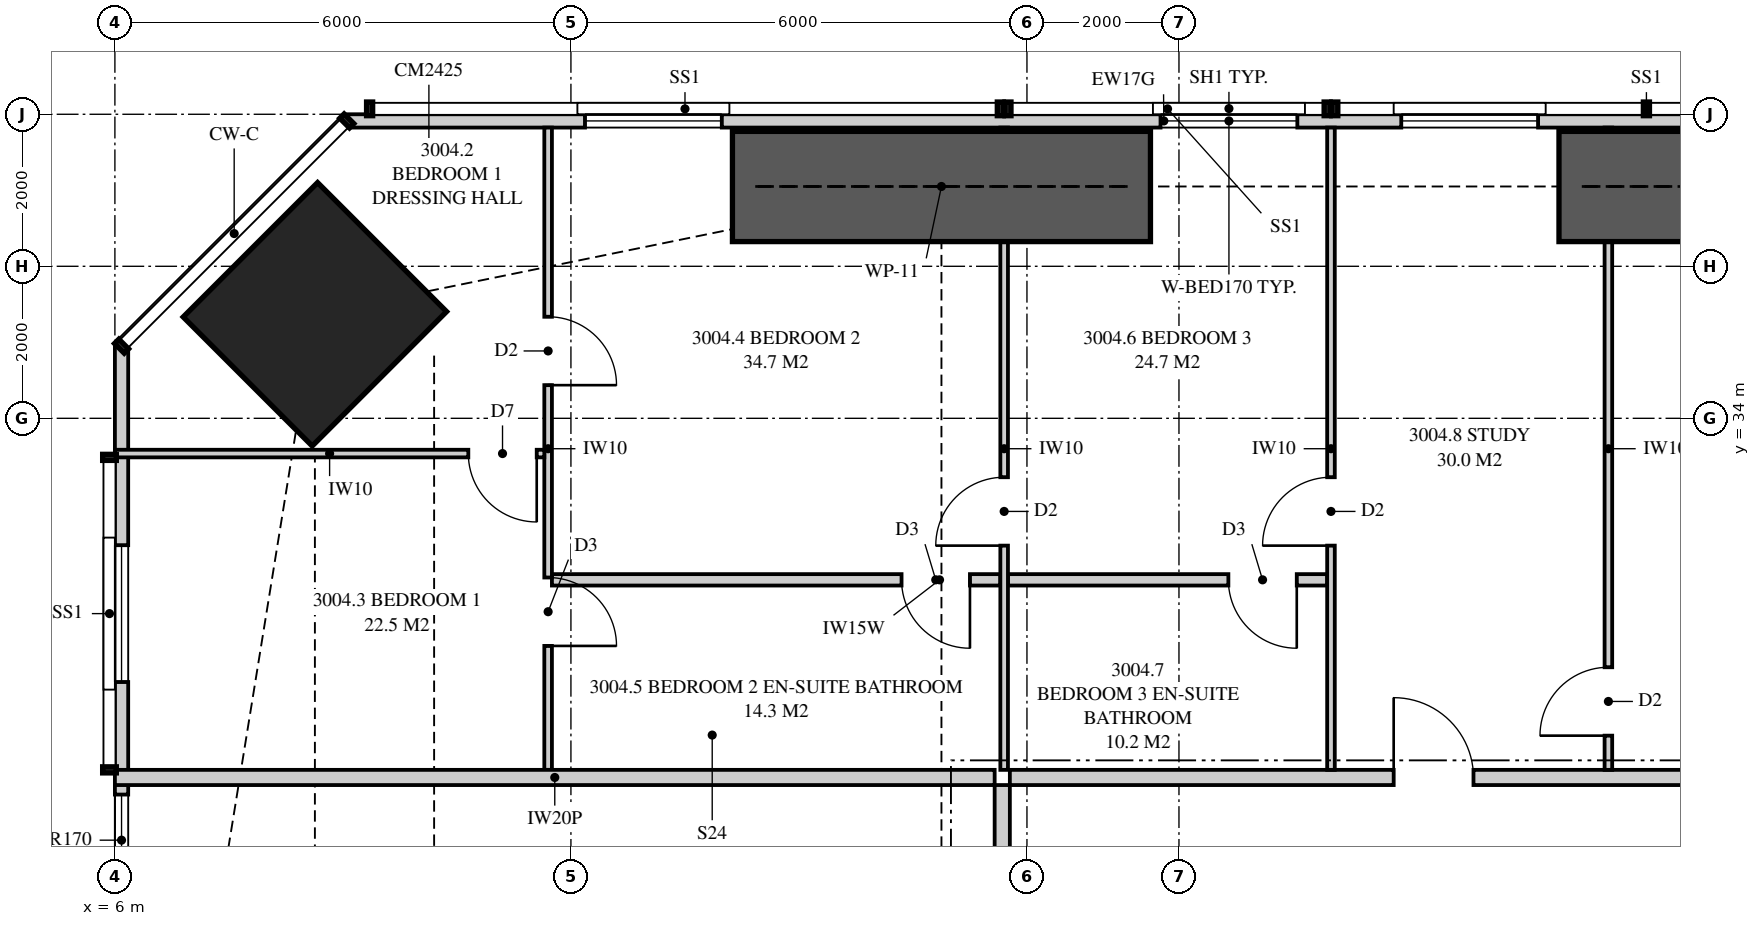
"""IFC4 building model, lengths in metres.
Left out: names, types, materials, properties, quantities, classifications, styles, units other than length and angle.
Written with IfcOpenShell. Run it as: python <this file> out.ifc"""

import sys

from ifc_helpers import new_model, si_unit, direction, frame, frame_2d, origin, origin_2d, place, context, subcontext, project, spatial, polyline, rectangle, outline, extrude, element, fill, save


model = new_model("IFC4")
c1 = context("Model", 3, precision=1e-05, world=origin(), true_north=direction((0.0, 1.0)))
c2 = subcontext(c1, "Body", "Model", "MODEL_VIEW")
j1 = project(units=[si_unit("LENGTHUNIT", "METRE"), si_unit("PLANEANGLEUNIT", "RADIAN")], contexts=[c1])
p1 = place(None, origin())
s1 = spatial("IfcSite", under=j1, at=p1, CompositionType="ELEMENT")
p2 = place(p1, origin())
s2 = spatial("IfcBuilding", under=s1, at=p2, CompositionType="ELEMENT")
p3 = place(p2, frame((0.0, 0.0, 111.55)))
s3 = spatial("IfcBuildingStorey", under=s2, at=p3, CompositionType="ELEMENT", Elevation=111.55)
p4 = place(p3, frame((8.631, 35.369, 0.0), z_axis=(0.0, 0.0, 1.0), x_axis=(0.707106781187, -0.707106781187, 0.0)))
e1 = element("IfcColumn", 1, at=p4, inside=s3, PredefinedType="COLUMN", context=c2, shape_type="SweptSolid", body=[
    extrude(rectangle(XDim=2.4, YDim=2.5, at=origin_2d()), origin(), (0.0, 0.0, 1.0), 3.35),
])
p5 = place(p3, frame((30.551, 37.913, 0.0), z_axis=(0.0, 0.0, 1.0), x_axis=(-1.0, 0.0, 0.0)))
e2 = element("IfcWall", 2, at=p5, inside=s3, PredefinedType="SOLIDWALL", context=c2, shape_type="SweptSolid", body=[
    extrude(outline(polyline([(0.0, 0.0), (21.499, 0.0), (21.499, 3.11), (13.879, 3.11), (13.879, 2.15), (13.834, 2.15), (13.834, 3.11), (13.676, 3.11), (13.676, 2.15), (0.0, 2.15), (0.0, 0.0)])), frame((0.0, 0.087, 0.0), z_axis=(0.0, -1.0, 0.0), x_axis=(1.0, 0.0, 0.0)), (0.0, 0.0, 1.0), 0.175),
])
p6 = place(p5, frame((5.826, 0.0, 0.4)))
e3 = element("IfcOpeningElement", 3, at=p6, cuts=e2, PredefinedType="OPENING", context=c2, shape_type="SweptSolid", body=[
    extrude(rectangle(XDim=1.8, YDim=1.7, at=frame_2d((0.9, 0.85))), frame((0.0, 0.097, 0.0), z_axis=(0.0, -1.0, 0.0), x_axis=(1.0, 0.0, 0.0)), (0.0, 0.0, 1.0), 0.195),
])
p7 = place(p5, frame((8.993, 0.0, 0.4)))
e4 = element("IfcOpeningElement", 4, at=p7, cuts=e2, PredefinedType="OPENING", context=c2, shape_type="SweptSolid", body=[
    extrude(rectangle(XDim=1.8, YDim=1.7, at=frame_2d((0.9, 0.85))), frame((0.0, 0.097, 0.0), z_axis=(0.0, -1.0, 0.0), x_axis=(1.0, 0.0, 0.0)), (0.0, 0.0, 1.0), 0.195),
])
p8 = place(p5, frame((16.566, 0.0, 0.4)))
e5 = element("IfcOpeningElement", 5, at=p8, cuts=e2, PredefinedType="OPENING", context=c2, shape_type="SweptSolid", body=[
    extrude(rectangle(XDim=1.8, YDim=1.7, at=frame_2d((0.9, 0.85))), frame((0.0, 0.097, 0.0), z_axis=(0.0, -1.0, 0.0), x_axis=(1.0, 0.0, 0.0)), (0.0, 0.0, 1.0), 0.195),
])
p9 = place(p3, frame((6.087, 34.949, 0.0), z_axis=(0.0, 0.0, 1.0), x_axis=(0.0, -1.0, 0.0)))
e6 = element("IfcWall", 6, at=p9, inside=s3, PredefinedType="SOLIDWALL", context=c2, shape_type="SweptSolid", body=[
    extrude(outline(polyline([(0.0, 0.0), (15.799, 0.0), (15.799, 2.15), (9.949, 2.15), (9.949, 3.11), (9.823, 3.11), (9.823, 2.15), (9.73, 2.15), (9.73, 3.11), (0.0, 3.11), (0.0, 0.0)])), frame((0.0, 0.087, 0.0), z_axis=(0.0, -1.0, 0.0), x_axis=(1.0, 0.0, 0.0)), (0.0, 0.0, 1.0), 0.175),
])
p10 = place(p9, frame((2.618, 0.0, 0.4)))
e7 = element("IfcOpeningElement", 7, at=p10, cuts=e6, PredefinedType="OPENING", context=c2, shape_type="SweptSolid", body=[
    extrude(rectangle(XDim=1.8, YDim=1.7, at=frame_2d((0.9, 0.85))), frame((0.0, 0.097, 0.0), z_axis=(0.0, -1.0, 0.0), x_axis=(1.0, 0.0, 0.0)), (0.0, 0.0, 1.0), 0.195),
])
p11 = place(p9, frame((5.899, 0.0, 0.4)))
e8 = element("IfcOpeningElement", 8, at=p11, cuts=e6, PredefinedType="OPENING", context=c2, shape_type="SweptSolid", body=[
    extrude(rectangle(XDim=1.2, YDim=1.7, at=frame_2d((0.6, 0.85))), frame((0.0, 0.097, 0.0), z_axis=(0.0, -1.0, 0.0), x_axis=(1.0, 0.0, 0.0)), (0.0, 0.0, 1.0), 0.195),
])
p12 = place(p9, frame((13.049, 0.0, 0.4)))
e9 = element("IfcOpeningElement", 9, at=p12, cuts=e6, PredefinedType="OPENING", context=c2, shape_type="SweptSolid", body=[
    extrude(rectangle(XDim=1.8, YDim=1.7, at=frame_2d((0.9, 0.85))), frame((0.0, 0.097, 0.0), z_axis=(0.0, -1.0, 0.0), x_axis=(1.0, 0.0, 0.0)), (0.0, 0.0, 1.0), 0.195),
])
p13 = place(p3, frame((17.775, 29.275, 0.0), z_axis=(0.0, 0.0, 1.0), x_axis=(1.0, 0.0, 0.0)))
e10 = element("IfcWall", 10, at=p13, inside=s3, PredefinedType="PARTITIONING", context=c2, shape_type="SweptSolid", body=[
    extrude(rectangle(XDim=9.188, YDim=0.2, at=frame_2d((4.594, 0.0))), origin(), (0.0, 0.0, 1.0), 3.11),
])
p14 = place(p13, frame((5.05, 0.0, 0.0)))
e11 = element("IfcOpeningElement", 11, at=p14, cuts=e10, PredefinedType="OPENING", context=c2, shape_type="SweptSolid", body=[
    extrude(rectangle(XDim=1.05, YDim=2.2, at=frame_2d((0.525, 1.1))), frame((0.0, 0.11, 0.0), z_axis=(0.0, -1.0, 0.0), x_axis=(1.0, 0.0, 0.0)), (0.0, 0.0, 1.0), 0.22),
])
p15 = place(p3, frame((11.7, 37.825, 0.0), z_axis=(0.0, 0.0, 1.0), x_axis=(0.0, -1.0, 0.0)))
e12 = element("IfcWall", 12, at=p15, inside=s3, PredefinedType="PARTITIONING", context=c2, shape_type="SweptSolid", body=[
    extrude(outline(polyline([(0.0, 0.0), (8.45, 0.0), (8.45, 3.11), (2.708, 3.11), (2.708, 2.15), (0.953, 2.15), (0.953, 3.11), (0.0, 3.11), (0.0, 0.0)])), frame((0.0, 0.05, 0.0), z_axis=(0.0, -1.0, 0.0), x_axis=(1.0, 0.0, 0.0)), (0.0, 0.0, 1.0), 0.1),
])
p16 = place(p15, frame((2.489, 0.0, 0.0)))
e13 = element("IfcOpeningElement", 13, at=p16, cuts=e12, PredefinedType="OPENING", context=c2, shape_type="SweptSolid", body=[
    extrude(rectangle(XDim=0.9, YDim=2.1, at=frame_2d((0.45, 1.05))), frame((0.0, 0.06, 0.0), z_axis=(0.0, -1.0, 0.0), x_axis=(1.0, 0.0, 0.0)), (0.0, 0.0, 1.0), 0.12),
])
p17 = place(p15, frame((5.919, 0.0, 0.0)))
e14 = element("IfcOpeningElement", 14, at=p17, cuts=e12, PredefinedType="OPENING", context=c2, shape_type="SweptSolid", body=[
    extrude(rectangle(XDim=0.9, YDim=2.1, at=frame_2d((0.45, 1.05))), frame((0.0, 0.06, 0.0), z_axis=(0.0, -1.0, 0.0), x_axis=(1.0, 0.0, 0.0)), (0.0, 0.0, 1.0), 0.12),
])
p18 = place(p3, frame((17.7, 37.825, 0.0), z_axis=(0.0, 0.0, 1.0), x_axis=(0.0, -1.0, 0.0)))
e15 = element("IfcWall", 15, at=p18, inside=s3, PredefinedType="PARTITIONING", context=c2, shape_type="SweptSolid", body=[
    extrude(outline(polyline([(1.635, 2.15), (0.0, 2.15), (0.0, 0.0), (8.45, 0.0), (8.45, 3.11), (1.635, 3.11), (1.635, 2.15)]), holes=[polyline([(1.021, 0.116), (0.529, 0.116), (0.529, 0.906), (1.021, 0.906), (1.021, 0.116)]), polyline([(1.021, 1.244), (0.529, 1.244), (0.529, 2.034), (1.021, 2.034), (1.021, 1.244)])]), frame((0.0, 0.05, 0.0), z_axis=(0.0, -1.0, 0.0), x_axis=(1.0, 0.0, 0.0)), (0.0, 0.0, 1.0), 0.1),
])
p19 = place(p18, frame((4.6, 0.0, 0.0)))
e16 = element("IfcOpeningElement", 16, at=p19, cuts=e15, PredefinedType="OPENING", context=c2, shape_type="SweptSolid", body=[
    extrude(rectangle(XDim=0.9, YDim=2.1, at=frame_2d((0.45, 1.05))), frame((0.0, 0.06, 0.0), z_axis=(0.0, -1.0, 0.0), x_axis=(1.0, 0.0, 0.0)), (0.0, 0.0, 1.0), 0.12),
])
p20 = place(p3, frame((22.0, 37.825, 0.0), z_axis=(0.0, 0.0, 1.0), x_axis=(0.0, -1.0, 0.0)))
e17 = element("IfcWall", 17, at=p20, inside=s3, PredefinedType="PARTITIONING", context=c2, shape_type="SweptSolid", body=[
    extrude(outline(polyline([(0.0, 0.0), (8.45, 0.0), (8.45, 3.11), (1.635, 3.11), (1.635, 2.15), (0.0, 2.15), (0.0, 3.11), (0.0, 0.0)])), frame((0.0, 0.05, 0.0), z_axis=(0.0, -1.0, 0.0), x_axis=(1.0, 0.0, 0.0)), (0.0, 0.0, 1.0), 0.1),
])
p21 = place(p20, frame((4.6, 0.0, 0.0)))
e18 = element("IfcOpeningElement", 18, at=p21, cuts=e17, PredefinedType="OPENING", context=c2, shape_type="SweptSolid", body=[
    extrude(rectangle(XDim=0.9, YDim=2.1, at=frame_2d((0.45, 1.05))), frame((0.0, 0.06, 0.0), z_axis=(0.0, -1.0, 0.0), x_axis=(1.0, 0.0, 0.0)), (0.0, 0.0, 1.0), 0.12),
])
p22 = place(p3, frame((6.0, 33.536, 0.0), z_axis=(0.0, 0.0, 1.0), x_axis=(1.0, 0.0, 0.0)))
e19 = element("IfcWall", 19, at=p22, inside=s3, PredefinedType="PARTITIONING", context=c2, shape_type="SweptSolid", body=[
    extrude(outline(polyline([(0.0, 0.0), (5.65, 0.0), (5.65, 3.11), (5.46, 3.11), (5.46, 2.51), (3.206, 2.51), (3.206, 2.15), (1.463, 2.15), (1.463, 3.11), (0.0, 3.11), (0.0, 0.0)])), frame((0.0, 0.05, 0.0), z_axis=(0.0, -1.0, 0.0), x_axis=(1.0, 0.0, 0.0)), (0.0, 0.0, 1.0), 0.1),
])
p23 = place(p22, frame((4.65, 0.0, 0.0)))
e20 = element("IfcOpeningElement", 20, at=p23, cuts=e19, PredefinedType="OPENING", context=c2, shape_type="SweptSolid", body=[
    extrude(rectangle(XDim=0.9, YDim=2.1, at=frame_2d((0.45, 1.05))), frame((0.0, 0.06, 0.0), z_axis=(0.0, -1.0, 0.0), x_axis=(1.0, 0.0, 0.0)), (0.0, 0.0, 1.0), 0.12),
])
p24 = place(p3, frame((11.75, 31.875, 0.0), z_axis=(0.0, 0.0, 1.0), x_axis=(1.0, 0.0, 0.0)))
e21 = element("IfcWall", 21, at=p24, inside=s3, PredefinedType="PLUMBINGWALL", context=c2, shape_type="SweptSolid", body=[
    extrude(outline(polyline([(0.0, 0.0), (5.9, 0.0), (5.9, 3.11), (5.438, 3.11), (5.438, 2.541), (4.812, 2.541), (4.812, 3.11), (0.0, 3.11), (0.0, 0.0)])), frame((0.0, 0.075, 0.0), z_axis=(0.0, -1.0, 0.0), x_axis=(1.0, 0.0, 0.0)), (0.0, 0.0, 1.0), 0.15),
])
p25 = place(p24, frame((4.6, 0.0, 0.0)))
e22 = element("IfcOpeningElement", 22, at=p25, cuts=e21, PredefinedType="OPENING", context=c2, shape_type="SweptSolid", body=[
    extrude(rectangle(XDim=0.9, YDim=2.1, at=frame_2d((0.45, 1.05))), frame((0.0, 0.085, 0.0), z_axis=(0.0, -1.0, 0.0), x_axis=(1.0, 0.0, 0.0)), (0.0, 0.0, 1.0), 0.17),
])
p26 = place(p3, frame((17.75, 31.875, 0.0), z_axis=(0.0, 0.0, 1.0), x_axis=(1.0, 0.0, 0.0)))
e23 = element("IfcWall", 23, at=p26, inside=s3, PredefinedType="PLUMBINGWALL", context=c2, shape_type="SweptSolid", body=[
    extrude(rectangle(XDim=4.2, YDim=0.15, at=frame_2d((2.1, 0.0))), origin(), (0.0, 0.0, 1.0), 3.11),
])
p27 = place(p26, frame((2.9, 0.0, 0.0)))
e24 = element("IfcOpeningElement", 24, at=p27, cuts=e23, PredefinedType="OPENING", context=c2, shape_type="SweptSolid", body=[
    extrude(rectangle(XDim=0.9, YDim=2.1, at=frame_2d((0.45, 1.05))), frame((0.0, 0.085, 0.0), z_axis=(0.0, -1.0, 0.0), x_axis=(1.0, 0.0, 0.0)), (0.0, 0.0, 1.0), 0.17),
])
p28 = place(p3, frame((25.65, 37.825, 0.0), z_axis=(0.0, 0.0, 1.0), x_axis=(0.0, -1.0, 0.0)))
e25 = element("IfcWall", 25, at=p28, inside=s3, PredefinedType="PARTITIONING", context=c2, shape_type="SweptSolid", body=[
    extrude(outline(polyline([(0.529, 2.15), (0.0, 2.15), (0.0, 0.0), (0.529, 0.0), (0.529, 0.034), (1.021, 0.034), (1.021, 0.0), (8.45, 0.0), (8.45, 3.11), (1.635, 3.11), (1.635, 2.15), (1.021, 2.15), (1.021, 2.116), (0.529, 2.116), (0.529, 2.15)])), frame((0.0, 0.05, 0.0), z_axis=(0.0, -1.0, 0.0), x_axis=(1.0, 0.0, 0.0)), (0.0, 0.0, 1.0), 0.1),
])
p29 = place(p28, frame((7.1, 0.0, 0.0)))
e26 = element("IfcOpeningElement", 26, at=p29, cuts=e25, PredefinedType="OPENING", context=c2, shape_type="SweptSolid", body=[
    extrude(rectangle(XDim=0.9, YDim=2.1, at=frame_2d((0.45, 1.05))), frame((0.0, 0.06, 0.0), z_axis=(0.0, -1.0, 0.0), x_axis=(1.0, 0.0, 0.0)), (0.0, 0.0, 1.0), 0.12),
])
p30 = place(p3, frame((6.0, 29.275, 0.0), z_axis=(0.0, 0.0, 1.0), x_axis=(1.0, 0.0, 0.0)))
e27 = element("IfcWall", 27, at=p30, inside=s3, PredefinedType="PARTITIONING", context=c2, shape_type="SweptSolid", body=[
    extrude(outline(polyline([(0.0, 0.0), (11.575, 0.0), (11.575, 3.11), (11.212, 3.11), (11.212, 2.541), (10.538, 2.541), (10.538, 3.11), (5.51, 3.11), (5.51, 2.51), (2.969, 2.51), (2.969, 2.541), (2.565, 2.541), (2.565, 2.15), (0.721, 2.15), (0.721, 3.11), (0.0, 3.11), (0.0, 0.0)])), frame((0.0, 0.1, 0.0), z_axis=(0.0, -1.0, 0.0), x_axis=(1.0, 0.0, 0.0)), (0.0, 0.0, 1.0), 0.2),
])
p31 = place(p3, frame((17.675, 22.9, 0.0), z_axis=(0.0, 0.0, 1.0), x_axis=(0.0, 1.0, 0.0)))
e28 = element("IfcWall", 28, at=p31, inside=s3, PredefinedType="PARTITIONING", context=c2, shape_type="SweptSolid", body=[
    extrude(outline(polyline([(0.0, 0.0), (6.275, 0.0), (6.275, 3.11), (3.862, 3.11), (3.862, 2.541), (3.188, 2.541), (3.188, 3.11), (0.0, 3.11), (0.0, 0.0)])), frame((0.0, 0.1, 0.0), z_axis=(0.0, -1.0, 0.0), x_axis=(1.0, 0.0, 0.0)), (0.0, 0.0, 1.0), 0.2),
])
p32 = place(p31, frame((2.238, 0.0, 0.0)))
e29 = element("IfcOpeningElement", 29, at=p32, cuts=e28, PredefinedType="OPENING", context=c2, shape_type="SweptSolid", body=[
    extrude(rectangle(XDim=1.8, YDim=2.1, at=frame_2d((0.9, 1.05))), frame((0.0, 0.11, 0.0), z_axis=(0.0, -1.0, 0.0), x_axis=(1.0, 0.0, 0.0)), (0.0, 0.0, 1.0), 0.22),
])
for number, where, z_axis, x_axis in (
    (30, (25.0, 37.05, 0.0), (0.0, 0.0, 1.0), (1.0, 0.0, 0.0)),
    (31, (14.125, 37.05, 0.0), (0.0, 0.0, 1.0), (1.0, 0.0, 0.0)),
):
    element("IfcWall", number, at=place(p3, frame(where, z_axis=z_axis, x_axis=x_axis)), inside=s3, PredefinedType="SHEAR", context=c2, shape_type="SweptSolid", body=[
        extrude(rectangle(XDim=5.5, YDim=1.45, at=frame_2d((2.75, 0.0))), origin(), (0.0, 0.0, 1.0), 3.35),
    ])
p33 = place(p6, origin())
e32 = element("IfcWindow", 32, at=p33, inside=s3, PartitioningType="SINGLE_PANEL", PredefinedType="WINDOW", context=c2, shape_type="SweptSolid", body=[
    extrude(rectangle(XDim=1.8, YDim=1.7, at=frame_2d((0.9, 0.85))), frame((0.0, 0.03, 0.0), z_axis=(0.0, -1.0, 0.0), x_axis=(1.0, 0.0, 0.0)), (0.0, 0.0, 1.0), 0.06),
])
fill(e3, e32)
p34 = place(p7, origin())
e33 = element("IfcWindow", 33, at=p34, inside=s3, PartitioningType="SINGLE_PANEL", PredefinedType="WINDOW", context=c2, shape_type="SweptSolid", body=[
    extrude(rectangle(XDim=1.8, YDim=1.7, at=frame_2d((0.9, 0.85))), frame((0.0, 0.03, 0.0), z_axis=(0.0, -1.0, 0.0), x_axis=(1.0, 0.0, 0.0)), (0.0, 0.0, 1.0), 0.06),
])
fill(e4, e33)
p35 = place(p8, origin())
e34 = element("IfcWindow", 34, at=p35, inside=s3, PartitioningType="SINGLE_PANEL", PredefinedType="WINDOW", context=c2, shape_type="SweptSolid", body=[
    extrude(rectangle(XDim=1.8, YDim=1.7, at=frame_2d((0.9, 0.85))), frame((0.0, 0.03, 0.0), z_axis=(0.0, -1.0, 0.0), x_axis=(1.0, 0.0, 0.0)), (0.0, 0.0, 1.0), 0.06),
])
fill(e5, e34)
p36 = place(p10, origin())
e35 = element("IfcWindow", 35, at=p36, inside=s3, PartitioningType="SINGLE_PANEL", PredefinedType="WINDOW", context=c2, shape_type="SweptSolid", body=[
    extrude(rectangle(XDim=1.8, YDim=1.7, at=frame_2d((0.9, 0.85))), frame((0.0, 0.03, 0.0), z_axis=(0.0, -1.0, 0.0), x_axis=(1.0, 0.0, 0.0)), (0.0, 0.0, 1.0), 0.06),
])
fill(e7, e35)
p37 = place(p11, origin())
e36 = element("IfcWindow", 36, at=p37, inside=s3, PartitioningType="SINGLE_PANEL", PredefinedType="WINDOW", context=c2, shape_type="SweptSolid", body=[
    extrude(rectangle(XDim=1.2, YDim=1.7, at=frame_2d((0.6, 0.85))), frame((0.0, 0.03, 0.0), z_axis=(0.0, -1.0, 0.0), x_axis=(1.0, 0.0, 0.0)), (0.0, 0.0, 1.0), 0.06),
])
fill(e8, e36)
p38 = place(p14, origin())
e37 = element("IfcDoor", 37, at=p38, inside=s3, OperationType="SINGLE_SWING_LEFT", PredefinedType="DOOR", context=c2, shape_type="SweptSolid", body=[
    extrude(rectangle(XDim=1.05, YDim=2.2, at=frame_2d((0.525, 1.1))), frame((0.0, 0.025, 0.0), z_axis=(0.0, -1.0, 0.0), x_axis=(1.0, 0.0, 0.0)), (0.0, 0.0, 1.0), 0.05),
])
fill(e11, e37)
p39 = place(p23, frame((0.9, 0.0, 0.0), z_axis=(0.0, 0.0, 1.0), x_axis=(-1.0, 0.0, 0.0)))
e38 = element("IfcDoor", 38, at=p39, inside=s3, OperationType="SINGLE_SWING_LEFT", PredefinedType="DOOR", context=c2, shape_type="SweptSolid", body=[
    extrude(rectangle(XDim=0.9, YDim=2.1, at=frame_2d((0.45, 1.05))), frame((0.0, 0.025, 0.0), z_axis=(0.0, -1.0, 0.0), x_axis=(1.0, 0.0, 0.0)), (0.0, 0.0, 1.0), 0.05),
])
fill(e20, e38)
p40 = place(p16, origin())
e39 = element("IfcDoor", 39, at=p40, inside=s3, OperationType="SINGLE_SWING_RIGHT", PredefinedType="DOOR", context=c2, shape_type="SweptSolid", body=[
    extrude(rectangle(XDim=0.9, YDim=2.1, at=frame_2d((0.45, 1.05))), frame((0.0, 0.025, 0.0), z_axis=(0.0, -1.0, 0.0), x_axis=(1.0, 0.0, 0.0)), (0.0, 0.0, 1.0), 0.05),
])
fill(e13, e39)
p41 = place(p19, frame((0.9, 0.0, 0.0), z_axis=(0.0, 0.0, 1.0), x_axis=(-1.0, 0.0, 0.0)))
e40 = element("IfcDoor", 40, at=p41, inside=s3, OperationType="SINGLE_SWING_LEFT", PredefinedType="DOOR", context=c2, shape_type="SweptSolid", body=[
    extrude(rectangle(XDim=0.9, YDim=2.1, at=frame_2d((0.45, 1.05))), frame((0.0, 0.025, 0.0), z_axis=(0.0, -1.0, 0.0), x_axis=(1.0, 0.0, 0.0)), (0.0, 0.0, 1.0), 0.05),
])
fill(e16, e40)
p42 = place(p25, frame((0.9, 0.0, 0.0), z_axis=(0.0, 0.0, 1.0), x_axis=(-1.0, 0.0, 0.0)))
e41 = element("IfcDoor", 41, at=p42, inside=s3, OperationType="SINGLE_SWING_LEFT", PredefinedType="DOOR", context=c2, shape_type="SweptSolid", body=[
    extrude(rectangle(XDim=0.9, YDim=2.1, at=frame_2d((0.45, 1.05))), frame((0.0, 0.025, 0.0), z_axis=(0.0, -1.0, 0.0), x_axis=(1.0, 0.0, 0.0)), (0.0, 0.0, 1.0), 0.05),
])
fill(e22, e41)
p43 = place(p21, frame((0.9, 0.0, 0.0), z_axis=(0.0, 0.0, 1.0), x_axis=(-1.0, 0.0, 0.0)))
e42 = element("IfcDoor", 42, at=p43, inside=s3, OperationType="SINGLE_SWING_LEFT", PredefinedType="DOOR", context=c2, shape_type="SweptSolid", body=[
    extrude(rectangle(XDim=0.9, YDim=2.1, at=frame_2d((0.45, 1.05))), frame((0.0, 0.025, 0.0), z_axis=(0.0, -1.0, 0.0), x_axis=(1.0, 0.0, 0.0)), (0.0, 0.0, 1.0), 0.05),
])
fill(e18, e42)
p44 = place(p27, frame((0.9, 0.0, 0.0), z_axis=(0.0, 0.0, 1.0), x_axis=(-1.0, 0.0, 0.0)))
e43 = element("IfcDoor", 43, at=p44, inside=s3, OperationType="SINGLE_SWING_LEFT", PredefinedType="DOOR", context=c2, shape_type="SweptSolid", body=[
    extrude(rectangle(XDim=0.9, YDim=2.1, at=frame_2d((0.45, 1.05))), frame((0.0, 0.025, 0.0), z_axis=(0.0, -1.0, 0.0), x_axis=(1.0, 0.0, 0.0)), (0.0, 0.0, 1.0), 0.05),
])
fill(e24, e43)
p45 = place(p17, origin())
e44 = element("IfcDoor", 44, at=p45, inside=s3, OperationType="SINGLE_SWING_RIGHT", PredefinedType="DOOR", context=c2, shape_type="SweptSolid", body=[
    extrude(rectangle(XDim=0.9, YDim=2.1, at=frame_2d((0.45, 1.05))), frame((0.0, 0.025, 0.0), z_axis=(0.0, -1.0, 0.0), x_axis=(1.0, 0.0, 0.0)), (0.0, 0.0, 1.0), 0.05),
])
fill(e14, e44)
p46 = place(p29, frame((0.9, 0.0, 0.0), z_axis=(0.0, 0.0, 1.0), x_axis=(-1.0, 0.0, 0.0)))
e45 = element("IfcDoor", 45, at=p46, inside=s3, OperationType="SINGLE_SWING_LEFT", PredefinedType="DOOR", context=c2, shape_type="SweptSolid", body=[
    extrude(rectangle(XDim=0.9, YDim=2.1, at=frame_2d((0.45, 1.05))), frame((0.0, 0.025, 0.0), z_axis=(0.0, -1.0, 0.0), x_axis=(1.0, 0.0, 0.0)), (0.0, 0.0, 1.0), 0.05),
])
fill(e26, e45)
save(model, sys.argv[1])
